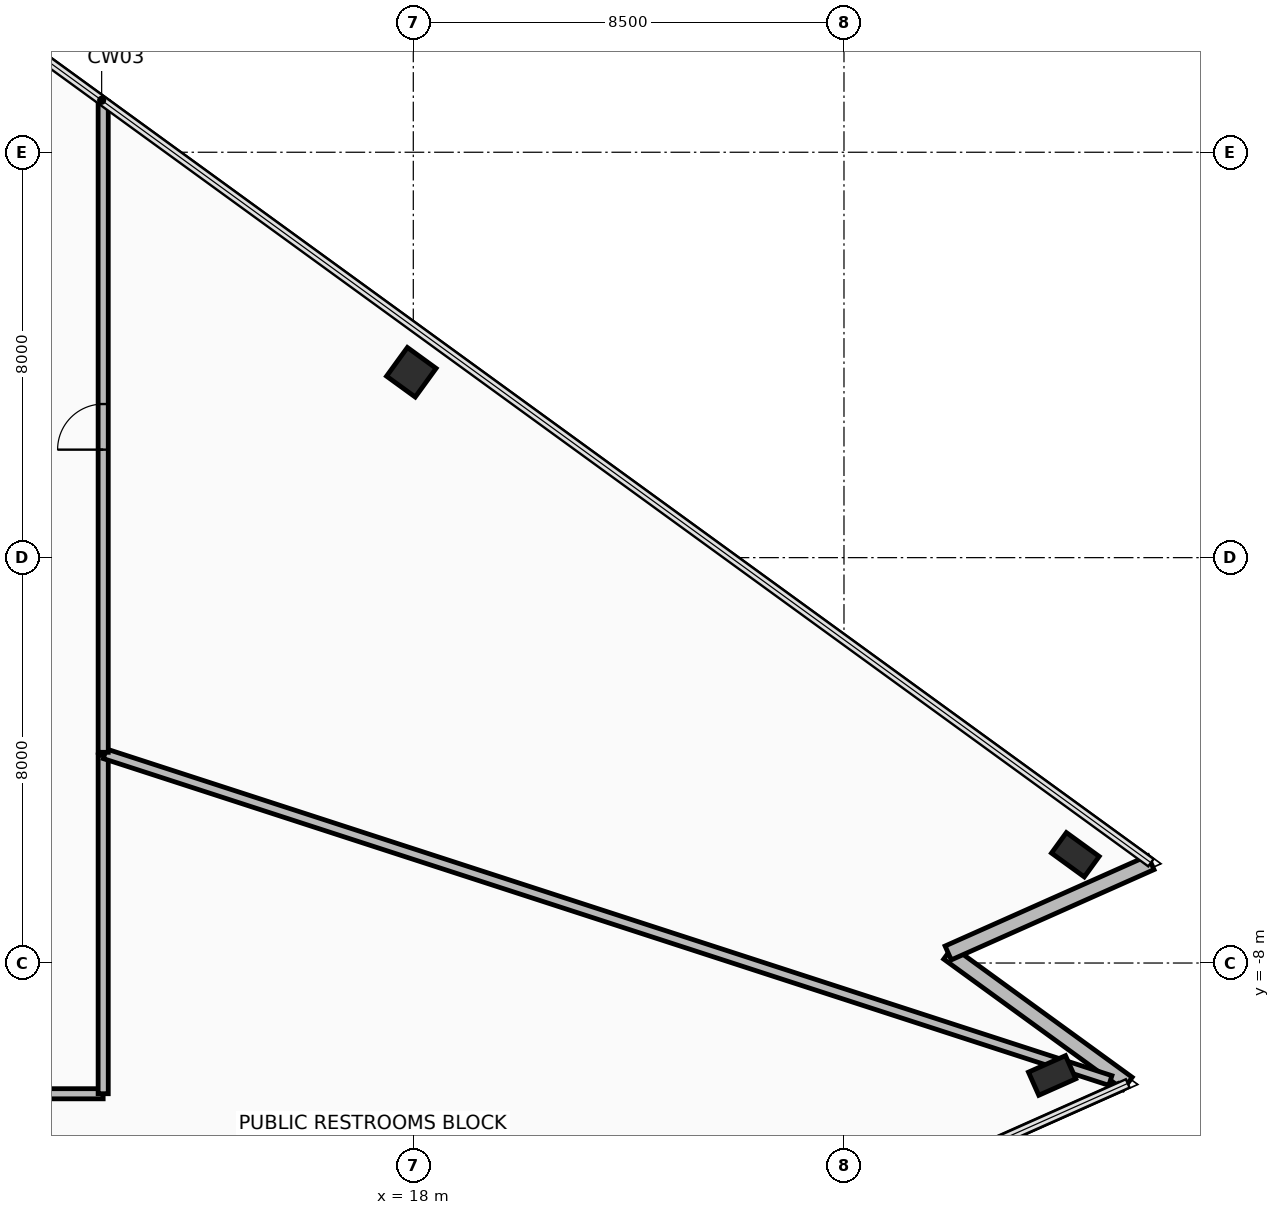
"""IFC4 building model, lengths in metres.
Left out: names, types, materials, properties, quantities, classifications, styles, units other than length and angle.
Written with IfcOpenShell. Run it as: python <this file> out.ifc"""

import sys

from ifc_helpers import new_model, si_unit, direction, frame, frame_2d, origin, origin_2d, place, context, subcontext, project, spatial, rectangle, hollow_rectangle, extrude, element, fill, save


model = new_model("IFC4")
c1 = context("Model", 3, precision=1e-05, world=origin(), true_north=direction((0.0, 1.0)))
c2 = subcontext(c1, "Body", "Model", "MODEL_VIEW")
j1 = project(units=[si_unit("LENGTHUNIT", "METRE"), si_unit("PLANEANGLEUNIT", "RADIAN")], contexts=[c1])
p1 = place(None, origin())
s1 = spatial("IfcSite", under=j1, at=p1, CompositionType="ELEMENT")
p2 = place(p1, origin())
s2 = spatial("IfcBuilding", under=s1, at=p2, CompositionType="ELEMENT")
p3 = place(p2, frame((0.0, 0.0, 112.45)))
s3 = spatial("IfcBuildingStorey", under=s2, at=p3, CompositionType="ELEMENT", Elevation=112.45)
for number, where, z_axis, x_axis in (
    (1, (30.608, -10.219, 0.0), (0.0, 0.0, 1.0), (0.914, 0.407, 0.0)),
    (2, (31.066, -5.863, 0.0), (0.0, 0.0, 1.0), (-0.809, 0.588, 0.0)),
):
    element("IfcColumn", number, at=place(p3, frame(where, z_axis=z_axis, x_axis=x_axis)), inside=s3, PredefinedType="COLUMN", context=c2, shape_type="SweptSolid", body=[
        extrude(hollow_rectangle(XDim=0.5, YDim=0.8, WallThickness=0.04, at=origin_2d()), origin(), (0.0, 0.0, 1.0), 3.6),
    ])
p4 = place(p3, frame((17.961, 3.658, -0.19), z_axis=(0.0, 0.0, 1.0), x_axis=(-0.809016994375, 0.587785252292, 0.0)))
e3 = element("IfcColumn", 3, at=p4, inside=s3, PredefinedType="COLUMN", context=c2, shape_type="SweptSolid", body=[
    extrude(hollow_rectangle(XDim=0.7, YDim=0.7, WallThickness=0.04, at=origin_2d()), origin(), (0.0, 0.0, 1.0), 3.79),
])
for number, where, z_axis, x_axis in (
    (4, (32.1, -10.376, 0.0), (0.0, 0.0, 1.0), (-0.809, 0.588, 0.0)),
    (5, (28.556, -7.802, 0.0), (0.0, 0.0, 1.0), (0.914, 0.407, 0.0)),
):
    element("IfcWall", number, at=place(p3, frame(where, z_axis=z_axis, x_axis=x_axis)), inside=s3, PredefinedType="STANDARD", context=c2, shape_type="SweptSolid", body=[
        extrude(rectangle(XDim=4.38, YDim=0.3, at=frame_2d((2.19, 0.0))), origin(), (0.0, 0.0, 1.0), 2.705),
    ])
p5 = place(p3, frame((4.388, -10.58, 0.0), z_axis=(0.0, 0.0, 1.0), x_axis=(1.0, 0.0, 0.0)))
e6 = element("IfcWall", 6, at=p5, inside=s3, PredefinedType="PARTITIONING", context=c2, shape_type="SweptSolid", body=[
    extrude(rectangle(XDim=7.492, YDim=0.2, at=frame_2d((3.746, 0.0))), origin(), (0.0, 0.0, 1.0), 2.855),
])
p6 = place(p5, frame((3.321, 0.0, 0.0)))
e7 = element("IfcOpeningElement", 7, at=p6, cuts=e6, PredefinedType="OPENING", context=c2, shape_type="SweptSolid", body=[
    extrude(rectangle(XDim=0.85, YDim=2.1, at=frame_2d((0.425, 1.05))), frame((0.0, 0.11, 0.0), z_axis=(0.0, -1.0, 0.0), x_axis=(1.0, 0.0, 0.0)), (0.0, 0.0, 1.0), 0.22),
])
p7 = place(p3, frame((11.88, -10.579, 0.0), z_axis=(0.0, 0.0, 1.0), x_axis=(0.0, 1.0, 0.0)))
e8 = element("IfcWall", 8, at=p7, inside=s3, PredefinedType="PARTITIONING", context=c2, shape_type="SweptSolid", body=[
    extrude(rectangle(XDim=6.685, YDim=0.2, at=frame_2d((3.342, 0.0))), origin(), (0.0, 0.0, 1.0), 2.855),
])
p8 = place(p3, frame((11.913, -3.871, 0.0), z_axis=(0.0, 0.0, 1.0), x_axis=(0.951054616976, -0.309022839818, 0.0)))
e9 = element("IfcWall", 9, at=p8, inside=s3, PredefinedType="PARTITIONING", context=c2, shape_type="SweptSolid", body=[
    extrude(rectangle(XDim=20.866, YDim=0.2, at=frame_2d((10.433, 0.0))), origin(), (0.0, 0.0, 1.0), 2.705),
])
p9 = place(p3, frame((31.936, -10.449, 0.0), z_axis=(0.0, 0.0, 1.0), x_axis=(-0.913546005366, -0.406735412866, 0.0)))
e10 = element("IfcWall", 10, at=p9, inside=s3, PredefinedType="PARTITIONING", context=c2, shape_type="SweptSolid", body=[
    extrude(rectangle(XDim=25.686, YDim=0.15, at=frame_2d((12.843, 0.0))), origin(), (0.0, 0.0, 1.0), 3.41),
])
p10 = place(p3, frame((11.88, -3.842, 0.0), z_axis=(0.0, 0.0, 1.0), x_axis=(0.0, 1.0, 0.0)))
e11 = element("IfcWall", 11, at=p10, inside=s3, PredefinedType="PARTITIONING", context=c2, shape_type="SweptSolid", body=[
    extrude(rectangle(XDim=12.845, YDim=0.2, at=frame_2d((6.423, 0.0))), origin(), (0.0, 0.0, 1.0), 2.705),
])
p11 = place(p10, frame((5.973, 0.0, 0.0)))
e12 = element("IfcOpeningElement", 12, at=p11, cuts=e11, PredefinedType="OPENING", context=c2, shape_type="SweptSolid", body=[
    extrude(rectangle(XDim=0.9, YDim=2.1, at=frame_2d((0.45, 1.05))), frame((0.0, 0.11, 0.0), z_axis=(0.0, -1.0, 0.0), x_axis=(1.0, 0.0, 0.0)), (0.0, 0.0, 1.0), 0.22),
])
p12 = place(p11, origin())
e13 = element("IfcDoor", 13, at=p12, inside=s3, OperationType="SINGLE_SWING_LEFT", PredefinedType="DOOR", context=c2, shape_type="SweptSolid", body=[
    extrude(rectangle(XDim=0.9, YDim=2.1, at=frame_2d((0.45, 1.05))), frame((0.0, 0.025, 0.0), z_axis=(0.0, -1.0, 0.0), x_axis=(1.0, 0.0, 0.0)), (0.0, 0.0, 1.0), 0.05),
])
fill(e12, e13)
save(model, sys.argv[1])
